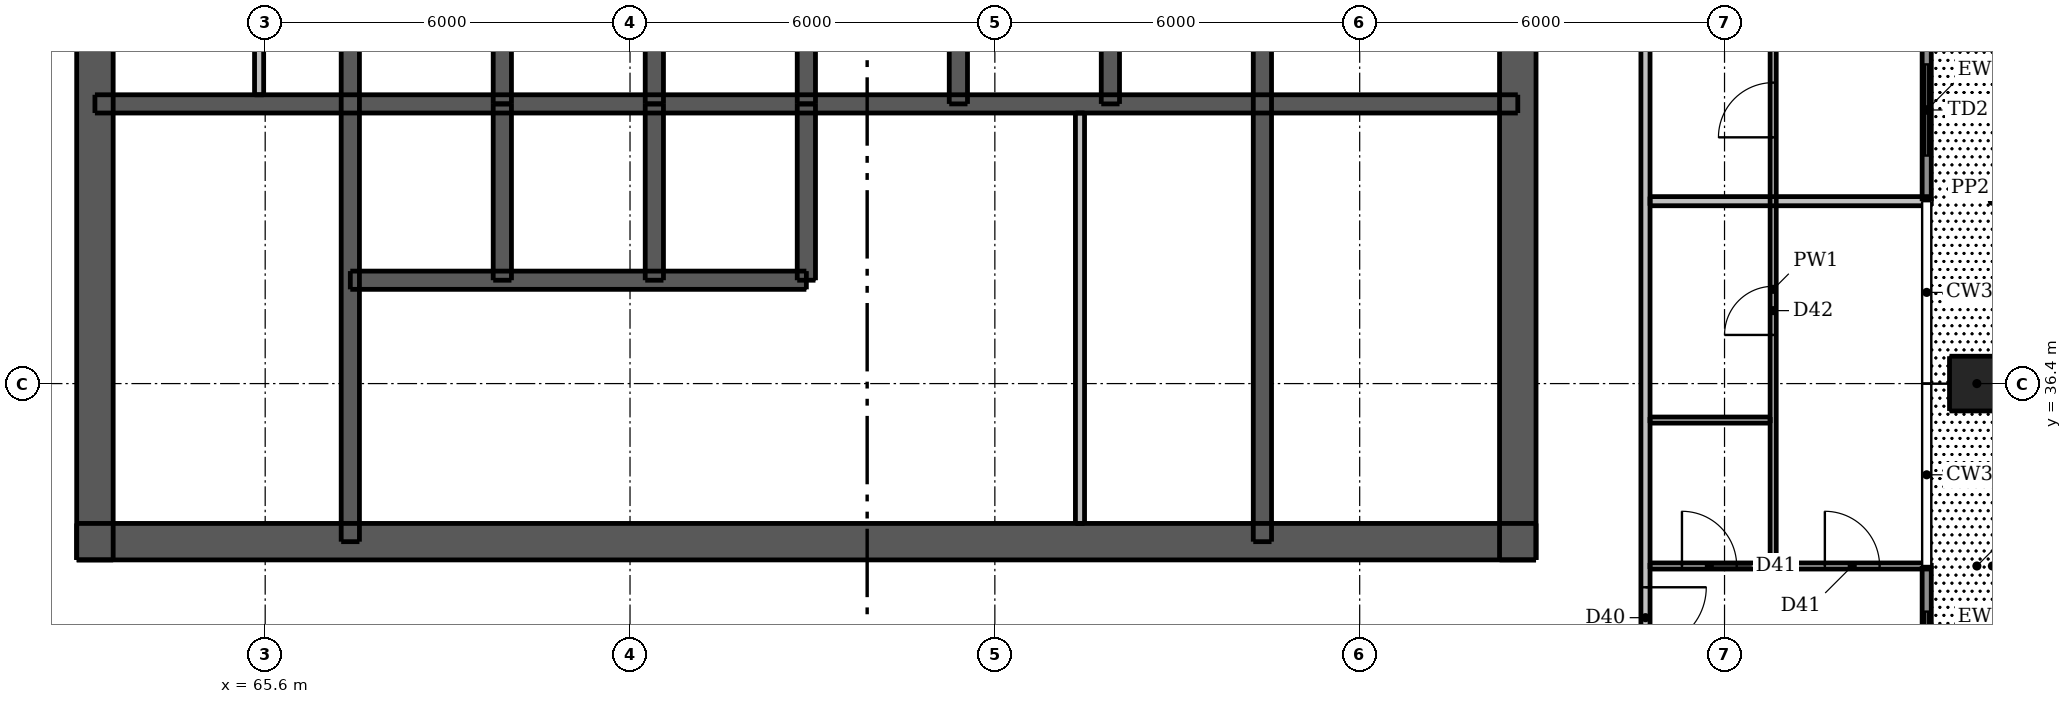
"""IFC4 building model, lengths in metres.
Left out: names, types, materials, properties, quantities, classifications, styles, units other than length and angle.
Written with IfcOpenShell. Run it as: python <this file> out.ifc"""

import sys

from ifc_helpers import new_model, si_unit, direction, frame, frame_2d, origin, origin_2d, place, context, subcontext, project, spatial, rectangle, extrude, element, fill, save


model = new_model("IFC4")
c1 = context("Model", 3, precision=1e-05, world=origin(), true_north=direction((0.0, 1.0)))
c2 = subcontext(c1, "Body", "Model", "MODEL_VIEW")
j1 = project(units=[si_unit("LENGTHUNIT", "METRE"), si_unit("PLANEANGLEUNIT", "RADIAN")], contexts=[c1])
p1 = place(None, origin())
s1 = spatial("IfcSite", under=j1, at=p1, CompositionType="ELEMENT")
p2 = place(p1, origin())
s2 = spatial("IfcBuilding", under=s1, at=p2, CompositionType="ELEMENT")
p3 = place(p2, frame((0.0, 0.0, 216.7)))
s3 = spatial("IfcBuildingStorey", under=s2, at=p3, CompositionType="ELEMENT", Elevation=216.7)
p4 = place(p3, frame((62.5, 33.8, 0.0), z_axis=(0.0, 0.0, 1.0), x_axis=(1.0, 0.0, 0.0)))
e1 = element("IfcWall", 1, at=p4, inside=s3, PredefinedType="SHEAR", context=c2, shape_type="SweptSolid", body=[
    extrude(rectangle(XDim=24.0, YDim=0.6, at=frame_2d((12.0, 0.0))), origin(), (0.0, 0.0, 1.0), 3.05),
])
p5 = place(p4, frame((1.925, 0.0, 0.0)))
e2 = element("IfcOpeningElement", 2, at=p5, cuts=e1, PredefinedType="OPENING", context=c2, shape_type="SweptSolid", body=[
    extrude(rectangle(XDim=1.1, YDim=2.1, at=frame_2d((0.55, 1.05))), frame((0.0, 0.31, 0.0), z_axis=(0.0, -1.0, 0.0), x_axis=(1.0, 0.0, 0.0)), (0.0, 0.0, 1.0), 0.62),
])
p6 = place(p4, frame((20.975, 0.0, 0.0)))
e3 = element("IfcOpeningElement", 3, at=p6, cuts=e1, PredefinedType="OPENING", context=c2, shape_type="SweptSolid", body=[
    extrude(rectangle(XDim=1.1, YDim=2.1, at=frame_2d((0.55, 1.05))), frame((0.0, 0.31, 0.0), z_axis=(0.0, -1.0, 0.0), x_axis=(1.0, 0.0, 0.0)), (0.0, 0.0, 1.0), 0.62),
])
p7 = place(p4, frame((8.0, 0.0, 0.0)))
e4 = element("IfcOpeningElement", 4, at=p7, cuts=e1, PredefinedType="OPENING", context=c2, shape_type="SweptSolid", body=[
    extrude(rectangle(XDim=1.1, YDim=2.1, at=frame_2d((0.55, 1.05))), frame((0.0, 0.31, 0.0), z_axis=(0.0, -1.0, 0.0), x_axis=(1.0, 0.0, 0.0)), (0.0, 0.0, 1.0), 0.62),
])
p8 = place(p4, frame((17.512, 0.0, 0.0)))
e5 = element("IfcOpeningElement", 5, at=p8, cuts=e1, PredefinedType="OPENING", context=c2, shape_type="SweptSolid", body=[
    extrude(rectangle(XDim=0.9, YDim=2.1, at=frame_2d((0.45, 1.05))), frame((0.0, 0.31, 0.0), z_axis=(0.0, -1.0, 0.0), x_axis=(1.0, 0.0, 0.0)), (0.0, 0.0, 1.0), 0.62),
])
p9 = place(p3, frame((62.8, 33.5, 0.0), z_axis=(0.0, 0.0, 1.0), x_axis=(0.0, 1.0, 0.0)))
e6 = element("IfcWall", 6, at=p9, inside=s3, PredefinedType="SHEAR", context=c2, shape_type="SweptSolid", body=[
    extrude(rectangle(XDim=24.0, YDim=0.6, at=frame_2d((12.0, 0.0))), origin(), (0.0, 0.0, 1.0), 3.05),
])
p10 = place(p9, frame((11.2, 0.0, 0.0)))
e7 = element("IfcOpeningElement", 7, at=p10, cuts=e6, PredefinedType="OPENING", context=c2, shape_type="SweptSolid", body=[
    extrude(rectangle(XDim=1.6, YDim=2.1, at=frame_2d((0.8, 1.05))), frame((0.0, 0.31, 0.0), z_axis=(0.0, -1.0, 0.0), x_axis=(1.0, 0.0, 0.0)), (0.0, 0.0, 1.0), 0.62),
])
p11 = place(p3, frame((86.2, 33.5, 0.0), z_axis=(0.0, 0.0, 1.0), x_axis=(0.0, 1.0, 0.0)))
e8 = element("IfcWall", 8, at=p11, inside=s3, PredefinedType="SHEAR", context=c2, shape_type="SweptSolid", body=[
    extrude(rectangle(XDim=24.0, YDim=0.6, at=frame_2d((12.0, 0.0))), origin(), (0.0, 0.0, 1.0), 3.05),
])
p12 = place(p11, frame((11.2, 0.0, 0.0)))
e9 = element("IfcOpeningElement", 9, at=p12, cuts=e8, PredefinedType="OPENING", context=c2, shape_type="SweptSolid", body=[
    extrude(rectangle(XDim=1.6, YDim=2.1, at=frame_2d((0.8, 1.05))), frame((0.0, 0.31, 0.0), z_axis=(0.0, -1.0, 0.0), x_axis=(1.0, 0.0, 0.0)), (0.0, 0.0, 1.0), 0.62),
])
p13 = place(p3, frame((62.8, 41.0, 0.0), z_axis=(0.0, 0.0, 1.0), x_axis=(1.0, 0.0, 0.0)))
e10 = element("IfcWall", 10, at=p13, inside=s3, PredefinedType="SHEAR", context=c2, shape_type="SweptSolid", body=[
    extrude(rectangle(XDim=23.4, YDim=0.3, at=frame_2d((11.7, 0.0))), origin(), (0.0, 0.0, 1.0), 3.05),
])
p14 = place(p3, frame((67.0, 33.8, 0.0), z_axis=(0.0, 0.0, 1.0), x_axis=(0.0, 1.0, 0.0)))
e11 = element("IfcWall", 11, at=p14, inside=s3, PredefinedType="SHEAR", context=c2, shape_type="SweptSolid", body=[
    extrude(rectangle(XDim=10.1, YDim=0.3, at=frame_2d((5.05, 0.0))), origin(), (0.0, 0.0, 1.0), 3.05),
])
p15 = place(p14, frame((0.5, 0.0, 0.0)))
e12 = element("IfcOpeningElement", 12, at=p15, cuts=e11, PredefinedType="OPENING", context=c2, shape_type="SweptSolid", body=[
    extrude(rectangle(XDim=1.1, YDim=2.1, at=frame_2d((0.55, 1.05))), frame((0.0, 0.16, 0.0), z_axis=(0.0, -1.0, 0.0), x_axis=(1.0, 0.0, 0.0)), (0.0, 0.0, 1.0), 0.32),
])
p16 = place(p3, frame((82.0, 33.8, 0.0), z_axis=(0.0, 0.0, 1.0), x_axis=(0.0, 1.0, 0.0)))
e13 = element("IfcWall", 13, at=p16, inside=s3, PredefinedType="SHEAR", context=c2, shape_type="SweptSolid", body=[
    extrude(rectangle(XDim=10.1, YDim=0.3, at=frame_2d((5.05, 0.0))), origin(), (0.0, 0.0, 1.0), 3.05),
])
for number, where, z_axis, x_axis in (
    (14, (69.5, 41.0, 0.0), (0.0, 0.0, 1.0), (0.0, 1.0, 0.0)),
    (15, (72.0, 41.0, 0.0), (0.0, 0.0, 1.0), (0.0, 1.0, 0.0)),
    (16, (74.5, 41.0, 0.0), (0.0, 0.0, 1.0), (0.0, 1.0, 0.0)),
    (17, (77.0, 41.0, 0.0), (0.0, 0.0, 1.0), (0.0, 1.0, 0.0)),
    (18, (79.5, 41.0, 0.0), (0.0, 0.0, 1.0), (0.0, 1.0, 0.0)),
):
    element("IfcWall", number, at=place(p3, frame(where, z_axis=z_axis, x_axis=x_axis)), inside=s3, PredefinedType="SHEAR", context=c2, shape_type="SweptSolid", body=[
        extrude(rectangle(XDim=2.9, YDim=0.3, at=frame_2d((1.45, 0.0))), origin(), (0.0, 0.0, 1.0), 3.05),
    ])
p17 = place(p3, frame((67.0, 38.1, 0.0), z_axis=(0.0, 0.0, 1.0), x_axis=(1.0, 0.0, 0.0)))
e19 = element("IfcWall", 19, at=p17, inside=s3, PredefinedType="SHEAR", context=c2, shape_type="SweptSolid", body=[
    extrude(rectangle(XDim=7.5, YDim=0.3, at=frame_2d((3.75, 0.0))), origin(), (0.0, 0.0, 1.0), 3.05),
])
p18 = place(p17, frame((0.7, 0.0, 0.0)))
e20 = element("IfcOpeningElement", 20, at=p18, cuts=e19, PredefinedType="OPENING", context=c2, shape_type="SweptSolid", body=[
    extrude(rectangle(XDim=1.1, YDim=2.1, at=frame_2d((0.55, 1.05))), frame((0.0, 0.16, 0.0), z_axis=(0.0, -1.0, 0.0), x_axis=(1.0, 0.0, 0.0)), (0.0, 0.0, 1.0), 0.32),
])
p19 = place(p17, frame((3.2, 0.0, 0.0)))
e21 = element("IfcOpeningElement", 21, at=p19, cuts=e19, PredefinedType="OPENING", context=c2, shape_type="SweptSolid", body=[
    extrude(rectangle(XDim=1.1, YDim=2.1, at=frame_2d((0.55, 1.05))), frame((0.0, 0.16, 0.0), z_axis=(0.0, -1.0, 0.0), x_axis=(1.0, 0.0, 0.0)), (0.0, 0.0, 1.0), 0.32),
])
p20 = place(p17, frame((5.65, 0.0, 0.0)))
e22 = element("IfcOpeningElement", 22, at=p20, cuts=e19, PredefinedType="OPENING", context=c2, shape_type="SweptSolid", body=[
    extrude(rectangle(XDim=1.2, YDim=2.1, at=frame_2d((0.6, 1.05))), frame((0.0, 0.16, 0.0), z_axis=(0.0, -1.0, 0.0), x_axis=(1.0, 0.0, 0.0)), (0.0, 0.0, 1.0), 0.32),
])
for number, where, z_axis, x_axis in (
    (23, (69.5, 38.1, 0.0), (0.0, 0.0, 1.0), (0.0, 1.0, 0.0)),
    (24, (72.0, 38.1, 0.0), (0.0, 0.0, 1.0), (0.0, 1.0, 0.0)),
    (25, (74.5, 38.1, 0.0), (0.0, 0.0, 1.0), (0.0, 1.0, 0.0)),
):
    element("IfcWall", number, at=place(p3, frame(where, z_axis=z_axis, x_axis=x_axis)), inside=s3, PredefinedType="SHEAR", context=c2, shape_type="SweptSolid", body=[
        extrude(rectangle(XDim=2.9, YDim=0.3, at=frame_2d((1.45, 0.0))), origin(), (0.0, 0.0, 1.0), 3.05),
    ])
p21 = place(p3, frame((93.75, 36.4, 0.0), z_axis=(0.0, 0.0, 1.0), x_axis=(1.0, 0.0, 0.0)))
e26 = element("IfcColumn", 26, at=p21, inside=s3, PredefinedType="COLUMN", context=c2, shape_type="SweptSolid", body=[
    extrude(rectangle(XDim=0.9, YDim=0.9, at=origin_2d()), origin(), (0.0, 0.0, 1.0), 3.3),
])
p22 = place(p3, frame((92.925, 30.4, 0.0), z_axis=(0.0, 0.0, 1.0), x_axis=(0.0, 1.0, 0.0)))
e27 = element("IfcWall", 27, at=p22, inside=s3, PredefinedType="SOLIDWALL", context=c2, shape_type="SweptSolid", body=[
    extrude(rectangle(XDim=3.0, YDim=0.15, at=frame_2d((1.5, 0.0))), origin(), (0.0, 0.0, 1.0), 3.05),
])
p23 = place(p22, frame((0.75, 0.0, 0.0)))
e28 = element("IfcOpeningElement", 28, at=p23, cuts=e27, PredefinedType="OPENING", context=c2, shape_type="SweptSolid", body=[
    extrude(rectangle(XDim=1.5, YDim=2.4, at=frame_2d((0.75, 1.2))), frame((0.0, 0.085, 0.0), z_axis=(0.0, -1.0, 0.0), x_axis=(1.0, 0.0, 0.0)), (0.0, 0.0, 1.0), 0.17),
])
p24 = place(p3, frame((92.925, 39.4, 0.0), z_axis=(0.0, 0.0, 1.0), x_axis=(0.0, 1.0, 0.0)))
e29 = element("IfcWall", 29, at=p24, inside=s3, PredefinedType="SOLIDWALL", context=c2, shape_type="SweptSolid", body=[
    extrude(rectangle(XDim=3.0, YDim=0.15, at=frame_2d((1.5, 0.0))), origin(), (0.0, 0.0, 1.0), 3.05),
])
p25 = place(p24, frame((0.75, 0.0, 0.0)))
e30 = element("IfcOpeningElement", 30, at=p25, cuts=e29, PredefinedType="OPENING", context=c2, shape_type="SweptSolid", body=[
    extrude(rectangle(XDim=1.5, YDim=2.4, at=frame_2d((0.75, 1.2))), frame((0.0, 0.085, 0.0), z_axis=(0.0, -1.0, 0.0), x_axis=(1.0, 0.0, 0.0)), (0.0, 0.0, 1.0), 0.17),
])
p26 = place(p3, frame((79.0, 34.1, 0.0), z_axis=(0.0, 0.0, 1.0), x_axis=(0.0, 1.0, 0.0)))
e31 = element("IfcWall", 31, at=p26, inside=s3, PredefinedType="PLUMBINGWALL", context=c2, shape_type="SweptSolid", body=[
    extrude(rectangle(XDim=6.75, YDim=0.15, at=frame_2d((3.375, 0.0))), origin(), (0.0, 0.0, 1.0), 3.05),
])
p27 = place(p3, frame((65.5, 41.15, 0.0), z_axis=(0.0, 0.0, 1.0), x_axis=(0.0, 1.0, 0.0)))
e32 = element("IfcWall", 32, at=p27, inside=s3, PredefinedType="PLUMBINGWALL", context=c2, shape_type="SweptSolid", body=[
    extrude(rectangle(XDim=2.6, YDim=0.15, at=frame_2d((1.3, 0.0))), origin(), (0.0, 0.0, 1.0), 3.05),
])
p28 = place(p3, frame((90.4, 33.45, 0.0), z_axis=(0.0, 0.0, 1.0), x_axis=(0.0, 1.0, 0.0)))
e33 = element("IfcWall", 33, at=p28, inside=s3, PredefinedType="PARTITIONING", context=c2, shape_type="SweptSolid", body=[
    extrude(rectangle(XDim=9.0, YDim=0.1, at=frame_2d((4.5, 0.0))), origin(), (0.0, 0.0, 1.0), 3.05),
])
p29 = place(p28, frame((3.75, 0.0, 0.0)))
e34 = element("IfcOpeningElement", 34, at=p29, cuts=e33, PredefinedType="OPENING", context=c2, shape_type="SweptSolid", body=[
    extrude(rectangle(XDim=0.8, YDim=2.1, at=frame_2d((0.4, 1.05))), frame((0.0, 0.06, 0.0), z_axis=(0.0, -1.0, 0.0), x_axis=(1.0, 0.0, 0.0)), (0.0, 0.0, 1.0), 0.12),
])
p30 = place(p28, frame((7.0, 0.0, 0.0)))
e35 = element("IfcOpeningElement", 35, at=p30, cuts=e33, PredefinedType="OPENING", context=c2, shape_type="SweptSolid", body=[
    extrude(rectangle(XDim=0.9, YDim=2.1, at=frame_2d((0.45, 1.05))), frame((0.0, 0.06, 0.0), z_axis=(0.0, -1.0, 0.0), x_axis=(1.0, 0.0, 0.0)), (0.0, 0.0, 1.0), 0.12),
])
p31 = place(p3, frame((88.375, 35.8, 0.0), z_axis=(0.0, 0.0, 1.0), x_axis=(1.0, 0.0, 0.0)))
e36 = element("IfcWall", 36, at=p31, inside=s3, PredefinedType="PARTITIONING", context=c2, shape_type="SweptSolid", body=[
    extrude(rectangle(XDim=1.975, YDim=0.1, at=frame_2d((0.988, 0.0))), origin(), (0.0, 0.0, 1.0), 3.05),
])
p32 = place(p3, frame((88.375, 33.4, 0.0), z_axis=(0.0, 0.0, 1.0), x_axis=(1.0, 0.0, 0.0)))
e37 = element("IfcWall", 37, at=p32, inside=s3, PredefinedType="PARTITIONING", context=c2, shape_type="SweptSolid", body=[
    extrude(rectangle(XDim=4.625, YDim=0.1, at=frame_2d((2.312, 0.0))), origin(), (0.0, 0.0, 1.0), 3.05),
])
p33 = place(p32, frame((0.525, 0.0, 0.0)))
e38 = element("IfcOpeningElement", 38, at=p33, cuts=e37, PredefinedType="OPENING", context=c2, shape_type="SweptSolid", body=[
    extrude(rectangle(XDim=0.9, YDim=2.1, at=frame_2d((0.45, 1.05))), frame((0.0, 0.06, 0.0), z_axis=(0.0, -1.0, 0.0), x_axis=(1.0, 0.0, 0.0)), (0.0, 0.0, 1.0), 0.12),
])
p34 = place(p32, frame((2.875, 0.0, 0.0)))
e39 = element("IfcOpeningElement", 39, at=p34, cuts=e37, PredefinedType="OPENING", context=c2, shape_type="SweptSolid", body=[
    extrude(rectangle(XDim=0.9, YDim=2.1, at=frame_2d((0.45, 1.05))), frame((0.0, 0.06, 0.0), z_axis=(0.0, -1.0, 0.0), x_axis=(1.0, 0.0, 0.0)), (0.0, 0.0, 1.0), 0.12),
])
p35 = place(p3, frame((88.3, 61.175, 0.0), z_axis=(0.0, 0.0, 1.0), x_axis=(0.0, -1.0, 0.0)))
e40 = element("IfcWall", 40, at=p35, inside=s3, PredefinedType="PARTITIONING", context=c2, shape_type="SweptSolid", body=[
    extrude(rectangle(XDim=29.4, YDim=0.15, at=frame_2d((14.7, 0.0))), origin(), (0.0, 0.0, 1.0), 3.05),
])
p36 = place(p35, frame((28.125, 0.0, 0.0)))
e41 = element("IfcOpeningElement", 41, at=p36, cuts=e40, PredefinedType="OPENING", context=c2, shape_type="SweptSolid", body=[
    extrude(rectangle(XDim=1.0, YDim=2.1, at=frame_2d((0.5, 1.05))), frame((0.0, 0.085, 0.0), z_axis=(0.0, -1.0, 0.0), x_axis=(1.0, 0.0, 0.0)), (0.0, 0.0, 1.0), 0.17),
])
p37 = place(p35, frame((15.275, 0.0, 0.0)))
e42 = element("IfcOpeningElement", 42, at=p37, cuts=e40, PredefinedType="OPENING", context=c2, shape_type="SweptSolid", body=[
    extrude(rectangle(XDim=1.0, YDim=2.1, at=frame_2d((0.5, 1.05))), frame((0.0, 0.085, 0.0), z_axis=(0.0, -1.0, 0.0), x_axis=(1.0, 0.0, 0.0)), (0.0, 0.0, 1.0), 0.17),
])
p38 = place(p35, frame((5.075, 0.0, 0.0)))
e43 = element("IfcOpeningElement", 43, at=p38, cuts=e40, PredefinedType="OPENING", context=c2, shape_type="SweptSolid", body=[
    extrude(rectangle(XDim=1.0, YDim=2.1, at=frame_2d((0.5, 1.05))), frame((0.0, 0.085, 0.0), z_axis=(0.0, -1.0, 0.0), x_axis=(1.0, 0.0, 0.0)), (0.0, 0.0, 1.0), 0.17),
])
p39 = place(p3, frame((88.375, 39.4, 0.0), z_axis=(0.0, 0.0, 1.0), x_axis=(1.0, 0.0, 0.0)))
e44 = element("IfcWall", 44, at=p39, inside=s3, PredefinedType="PARTITIONING", context=c2, shape_type="SweptSolid", body=[
    extrude(rectangle(XDim=4.625, YDim=0.15, at=frame_2d((2.312, 0.0))), origin(), (0.0, 0.0, 1.0), 3.05),
])
p40 = place(p23, origin())
e45 = element("IfcDoor", 45, at=p40, inside=s3, OperationType="DOUBLE_DOOR_SLIDING", PredefinedType="DOOR", context=c2, shape_type="SweptSolid", body=[
    extrude(rectangle(XDim=1.5, YDim=2.4, at=frame_2d((0.75, 1.2))), frame((0.0, 0.025, 0.0), z_axis=(0.0, -1.0, 0.0), x_axis=(1.0, 0.0, 0.0)), (0.0, 0.0, 1.0), 0.05),
])
fill(e28, e45)
p41 = place(p25, origin())
e46 = element("IfcDoor", 46, at=p41, inside=s3, OperationType="DOUBLE_DOOR_SLIDING", PredefinedType="DOOR", context=c2, shape_type="SweptSolid", body=[
    extrude(rectangle(XDim=1.5, YDim=2.4, at=frame_2d((0.75, 1.2))), frame((0.0, 0.025, 0.0), z_axis=(0.0, -1.0, 0.0), x_axis=(1.0, 0.0, 0.0)), (0.0, 0.0, 1.0), 0.05),
])
fill(e30, e46)
p42 = place(p5, origin())
e47 = element("IfcDoor", 47, at=p42, inside=s3, OperationType="SINGLE_SWING_LEFT", PredefinedType="DOOR", context=c2, shape_type="SweptSolid", body=[
    extrude(rectangle(XDim=1.1, YDim=2.1, at=frame_2d((0.55, 1.05))), frame((0.0, 0.288, 0.0), z_axis=(0.0, -1.0, 0.0), x_axis=(1.0, 0.0, 0.0)), (0.0, 0.0, 1.0), 0.05),
])
fill(e2, e47)
p43 = place(p6, origin())
e48 = element("IfcDoor", 48, at=p43, inside=s3, OperationType="SINGLE_SWING_RIGHT", PredefinedType="DOOR", context=c2, shape_type="SweptSolid", body=[
    extrude(rectangle(XDim=1.1, YDim=2.1, at=frame_2d((0.55, 1.05))), frame((0.0, 0.288, 0.0), z_axis=(0.0, -1.0, 0.0), x_axis=(1.0, 0.0, 0.0)), (0.0, 0.0, 1.0), 0.05),
])
fill(e3, e48)
p44 = place(p7, origin())
e49 = element("IfcDoor", 49, at=p44, inside=s3, OperationType="SINGLE_SWING_LEFT", PredefinedType="DOOR", context=c2, shape_type="SweptSolid", body=[
    extrude(rectangle(XDim=1.1, YDim=2.1, at=frame_2d((0.55, 1.05))), frame((0.0, 0.288, 0.0), z_axis=(0.0, -1.0, 0.0), x_axis=(1.0, 0.0, 0.0)), (0.0, 0.0, 1.0), 0.05),
])
fill(e4, e49)
p45 = place(p15, origin())
e50 = element("IfcDoor", 50, at=p45, inside=s3, OperationType="SINGLE_SWING_RIGHT", PredefinedType="DOOR", context=c2, shape_type="SweptSolid", body=[
    extrude(rectangle(XDim=1.1, YDim=2.1, at=frame_2d((0.55, 1.05))), frame((0.0, -0.087, 0.0), z_axis=(0.0, -1.0, 0.0), x_axis=(1.0, 0.0, 0.0)), (0.0, 0.0, 1.0), 0.05),
])
fill(e12, e50)
p46 = place(p8, origin())
e51 = element("IfcDoor", 51, at=p46, inside=s3, OperationType="SINGLE_SWING_LEFT", PredefinedType="DOOR", context=c2, shape_type="SweptSolid", body=[
    extrude(rectangle(XDim=0.9, YDim=2.1, at=frame_2d((0.45, 1.05))), frame((0.0, 0.288, 0.0), z_axis=(0.0, -1.0, 0.0), x_axis=(1.0, 0.0, 0.0)), (0.0, 0.0, 1.0), 0.05),
])
fill(e5, e51)
p47 = place(p18, origin())
e52 = element("IfcDoor", 52, at=p47, inside=s3, OperationType="DOUBLE_DOOR_SLIDING", PredefinedType="DOOR", context=c2, shape_type="SweptSolid", body=[
    extrude(rectangle(XDim=1.1, YDim=2.1, at=frame_2d((0.55, 1.05))), frame((0.0, 0.025, 0.0), z_axis=(0.0, -1.0, 0.0), x_axis=(1.0, 0.0, 0.0)), (0.0, 0.0, 1.0), 0.05),
])
fill(e20, e52)
p48 = place(p19, origin())
e53 = element("IfcDoor", 53, at=p48, inside=s3, OperationType="DOUBLE_DOOR_SLIDING", PredefinedType="DOOR", context=c2, shape_type="SweptSolid", body=[
    extrude(rectangle(XDim=1.1, YDim=2.1, at=frame_2d((0.55, 1.05))), frame((0.0, 0.025, 0.0), z_axis=(0.0, -1.0, 0.0), x_axis=(1.0, 0.0, 0.0)), (0.0, 0.0, 1.0), 0.05),
])
fill(e21, e53)
p49 = place(p20, origin())
e54 = element("IfcDoor", 54, at=p49, inside=s3, OperationType="DOUBLE_DOOR_SLIDING", PredefinedType="DOOR", context=c2, shape_type="SweptSolid", body=[
    extrude(rectangle(XDim=1.2, YDim=2.1, at=frame_2d((0.6, 1.05))), frame((0.0, 0.025, 0.0), z_axis=(0.0, -1.0, 0.0), x_axis=(1.0, 0.0, 0.0)), (0.0, 0.0, 1.0), 0.05),
])
fill(e22, e54)
p50 = place(p36, origin())
e55 = element("IfcDoor", 55, at=p50, inside=s3, OperationType="SINGLE_SWING_LEFT", PredefinedType="DOOR", context=c2, shape_type="SweptSolid", body=[
    extrude(rectangle(XDim=1.0, YDim=2.1, at=frame_2d((0.5, 1.05))), frame((0.0, 0.025, 0.0), z_axis=(0.0, -1.0, 0.0), x_axis=(1.0, 0.0, 0.0)), (0.0, 0.0, 1.0), 0.05),
])
fill(e41, e55)
p51 = place(p33, origin())
e56 = element("IfcDoor", 56, at=p51, inside=s3, OperationType="SINGLE_SWING_LEFT", PredefinedType="DOOR", context=c2, shape_type="SweptSolid", body=[
    extrude(rectangle(XDim=0.9, YDim=2.1, at=frame_2d((0.45, 1.05))), frame((0.0, 0.025, 0.0), z_axis=(0.0, -1.0, 0.0), x_axis=(1.0, 0.0, 0.0)), (0.0, 0.0, 1.0), 0.05),
])
fill(e38, e56)
p52 = place(p34, origin())
e57 = element("IfcDoor", 57, at=p52, inside=s3, OperationType="SINGLE_SWING_LEFT", PredefinedType="DOOR", context=c2, shape_type="SweptSolid", body=[
    extrude(rectangle(XDim=0.9, YDim=2.1, at=frame_2d((0.45, 1.05))), frame((0.0, 0.025, 0.0), z_axis=(0.0, -1.0, 0.0), x_axis=(1.0, 0.0, 0.0)), (0.0, 0.0, 1.0), 0.05),
])
fill(e39, e57)
p53 = place(p29, origin())
e58 = element("IfcDoor", 58, at=p53, inside=s3, OperationType="SINGLE_SWING_LEFT", PredefinedType="DOOR", context=c2, shape_type="SweptSolid", body=[
    extrude(rectangle(XDim=0.8, YDim=2.1, at=frame_2d((0.4, 1.05))), frame((0.0, 0.025, 0.0), z_axis=(0.0, -1.0, 0.0), x_axis=(1.0, 0.0, 0.0)), (0.0, 0.0, 1.0), 0.05),
])
fill(e34, e58)
p54 = place(p30, origin())
e59 = element("IfcDoor", 59, at=p54, inside=s3, OperationType="SINGLE_SWING_LEFT", PredefinedType="DOOR", context=c2, shape_type="SweptSolid", body=[
    extrude(rectangle(XDim=0.9, YDim=2.1, at=frame_2d((0.45, 1.05))), frame((0.0, 0.025, 0.0), z_axis=(0.0, -1.0, 0.0), x_axis=(1.0, 0.0, 0.0)), (0.0, 0.0, 1.0), 0.05),
])
fill(e35, e59)
save(model, sys.argv[1])
